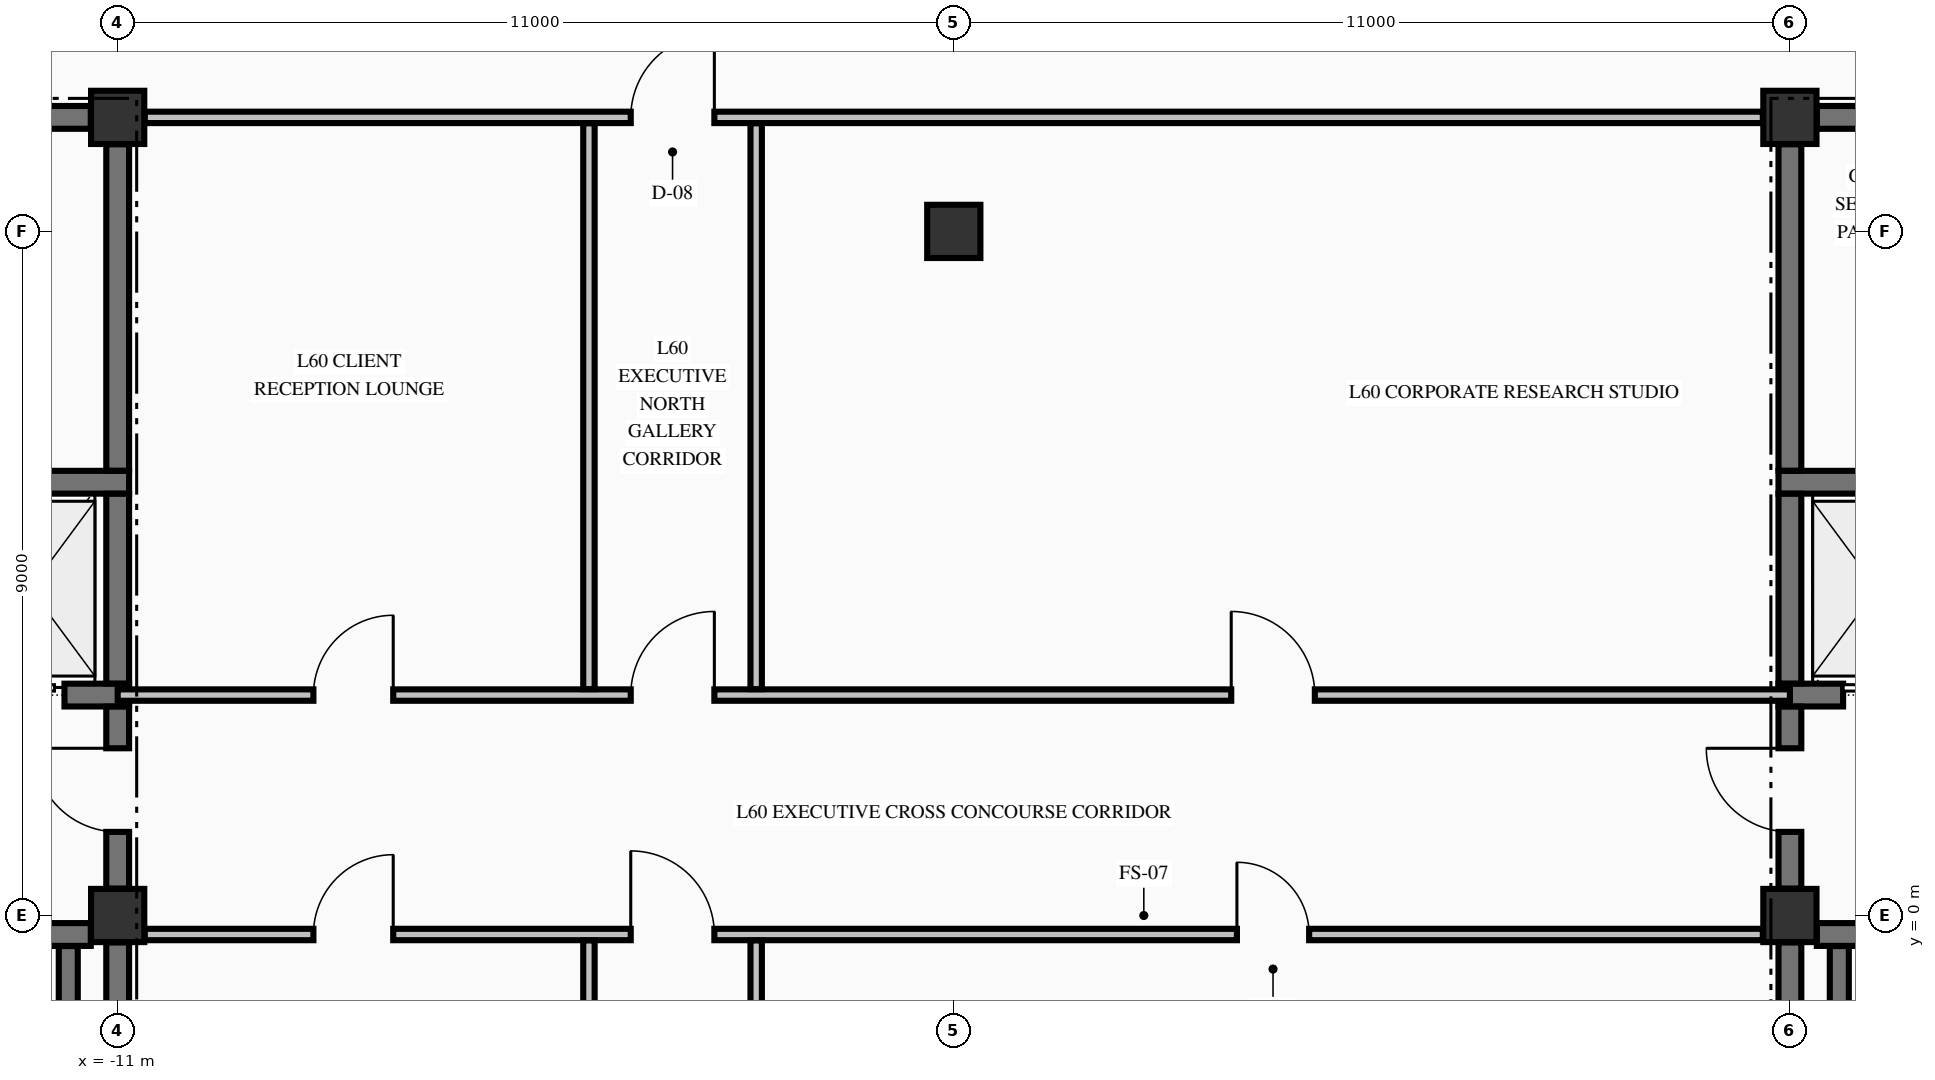
"""IFC4 building model, lengths in metres.
Left out: names, types, materials, properties, quantities, classifications, styles, units other than length and angle.
Written with IfcOpenShell. Run it as: python <this file> out.ifc"""

import sys

from ifc_helpers import new_model, si_unit, direction, frame, frame_2d, origin, origin_2d, place, context, subcontext, project, spatial, rectangle, extrude, element, fill, save


model = new_model("IFC4")
c1 = context("Model", 3, precision=1e-05, world=origin(), true_north=direction((0.0, 1.0)))
c2 = subcontext(c1, "Body", "Model", "MODEL_VIEW")
j1 = project(units=[si_unit("LENGTHUNIT", "METRE"), si_unit("PLANEANGLEUNIT", "RADIAN")], contexts=[c1])
p1 = place(None, origin())
s1 = spatial("IfcSite", under=j1, at=p1, CompositionType="ELEMENT")
p2 = place(p1, origin())
s2 = spatial("IfcBuilding", under=s1, at=p2, CompositionType="ELEMENT")
p3 = place(p2, frame((0.0, 0.0, 230.05)))
s3 = spatial("IfcBuildingStorey", under=s2, at=p3, CompositionType="ELEMENT", Elevation=230.05)
for number, where, z_axis, x_axis in (
    (1, (-11.0, 0.0, -0.25), (0.0, 0.0, 1.0), (1.0, 0.0, 0.0)),
    (2, (-11.0, 10.5, -0.25), (0.0, 0.0, 1.0), (1.0, 0.0, 0.0)),
    (3, (11.0, 0.0, -0.25), (0.0, 0.0, 1.0), (1.0, 0.0, 0.0)),
    (4, (11.0, 10.5, -0.25), (0.0, 0.0, 1.0), (1.0, 0.0, 0.0)),
    (5, (0.0, 9.0, -0.25), (0.0, 0.0, 1.0), (1.0, 0.0, 0.0)),
):
    element("IfcColumn", number, at=place(p3, frame(where, z_axis=z_axis, x_axis=x_axis)), inside=s3, PredefinedType="COLUMN", context=c2, shape_type="SweptSolid", body=[
        extrude(rectangle(XDim=0.7, YDim=0.7, at=origin_2d()), origin(), (0.0, 0.0, 1.0), 3.23),
    ])
p4 = place(p3, frame((-20.571, -0.25, 0.0), z_axis=(0.0, 0.0, 1.0), x_axis=(1.0, 0.0, 0.0)))
e6 = element("IfcWall", 6, at=p4, inside=s3, PredefinedType="SHEAR", context=c2, shape_type="SweptSolid", body=[
    extrude(rectangle(XDim=9.217, YDim=0.3, at=frame_2d((4.608, 0.0))), origin(), (0.0, 0.0, 1.0), 2.98),
])
p5 = place(p4, frame((6.871, 0.0, 0.0)))
e7 = element("IfcOpeningElement", 7, at=p5, cuts=e6, PredefinedType="OPENING", context=c2, shape_type="SweptSolid", body=[
    extrude(rectangle(XDim=1.1, YDim=2.15, at=frame_2d((0.55, 1.075))), frame((0.0, 0.16, 0.0), z_axis=(0.0, -1.0, 0.0), x_axis=(1.0, 0.0, 0.0)), (0.0, 0.0, 1.0), 0.32),
])
p6 = place(p3, frame((11.354, -0.25, 0.0), z_axis=(0.0, 0.0, 1.0), x_axis=(1.0, 0.0, 0.0)))
e8 = element("IfcWall", 8, at=p6, inside=s3, PredefinedType="SHEAR", context=c2, shape_type="SweptSolid", body=[
    extrude(rectangle(XDim=3.521, YDim=0.3, at=frame_2d((1.76, 0.0))), origin(), (0.0, 0.0, 1.0), 2.98),
])
p7 = place(p6, frame((1.246, 0.0, 0.0)))
e9 = element("IfcOpeningElement", 9, at=p7, cuts=e8, PredefinedType="OPENING", context=c2, shape_type="SweptSolid", body=[
    extrude(rectangle(XDim=1.1, YDim=2.15, at=frame_2d((0.55, 1.075))), frame((0.0, 0.16, 0.0), z_axis=(0.0, -1.0, 0.0), x_axis=(1.0, 0.0, 0.0)), (0.0, 0.0, 1.0), 0.32),
])
p8 = place(p3, frame((-14.875, 2.9, 0.0), z_axis=(0.0, 0.0, 1.0), x_axis=(1.0, 0.0, 0.0)))
e10 = element("IfcWall", 10, at=p8, inside=s3, PredefinedType="SHEAR", context=c2, shape_type="SweptSolid", body=[
    extrude(rectangle(XDim=4.025, YDim=0.3, at=frame_2d((2.012, 0.0))), origin(), (0.0, 0.0, 1.0), 2.98),
])
p9 = place(p8, frame((2.075, 0.0, 0.0)))
e11 = element("IfcOpeningElement", 11, at=p9, cuts=e10, PredefinedType="OPENING", context=c2, shape_type="SweptSolid", body=[
    extrude(rectangle(XDim=1.1, YDim=2.2, at=frame_2d((0.55, 1.1))), frame((0.0, 0.16, 0.0), z_axis=(0.0, -1.0, 0.0), x_axis=(1.0, 0.0, 0.0)), (0.0, 0.0, 1.0), 0.32),
])
p10 = place(p3, frame((10.85, 2.9, 0.0), z_axis=(0.0, 0.0, 1.0), x_axis=(1.0, 0.0, 0.0)))
e12 = element("IfcWall", 12, at=p10, inside=s3, PredefinedType="SHEAR", context=c2, shape_type="SweptSolid", body=[
    extrude(rectangle(XDim=4.025, YDim=0.3, at=frame_2d((2.012, 0.0))), origin(), (0.0, 0.0, 1.0), 2.98),
])
p11 = place(p10, frame((0.85, 0.0, 0.0)))
e13 = element("IfcOpeningElement", 13, at=p11, cuts=e12, PredefinedType="OPENING", context=c2, shape_type="SweptSolid", body=[
    extrude(rectangle(XDim=1.1, YDim=2.2, at=frame_2d((0.55, 1.1))), frame((0.0, 0.16, 0.0), z_axis=(0.0, -1.0, 0.0), x_axis=(1.0, 0.0, 0.0)), (0.0, 0.0, 1.0), 0.32),
])
for number, where, z_axis, x_axis in (
    (14, (-14.875, 5.7, 0.0), (0.0, 0.0, 1.0), (1.0, 0.0, 0.0)),
    (15, (10.85, 5.7, 0.0), (0.0, 0.0, 1.0), (1.0, 0.0, 0.0)),
):
    element("IfcWall", number, at=place(p3, frame(where, z_axis=z_axis, x_axis=x_axis)), inside=s3, PredefinedType="SHEAR", context=c2, shape_type="SweptSolid", body=[
        extrude(rectangle(XDim=4.025, YDim=0.3, at=frame_2d((2.012, 0.0))), origin(), (0.0, 0.0, 1.0), 2.98),
    ])
p12 = place(p3, frame((-14.7, 10.5, 0.0), z_axis=(0.0, 0.0, 1.0), x_axis=(1.0, 0.0, 0.0)))
e16 = element("IfcWall", 16, at=p12, inside=s3, PredefinedType="SHEAR", context=c2, shape_type="SweptSolid", body=[
    extrude(rectangle(XDim=3.346, YDim=0.3, at=frame_2d((1.673, 0.0))), origin(), (0.0, 0.0, 1.0), 2.98),
])
p13 = place(p12, frame((0.775, 0.0, 0.0)))
e17 = element("IfcOpeningElement", 17, at=p13, cuts=e16, PredefinedType="OPENING", context=c2, shape_type="SweptSolid", body=[
    extrude(rectangle(XDim=0.95, YDim=2.15, at=frame_2d((0.475, 1.075))), frame((0.0, 0.16, 0.0), z_axis=(0.0, -1.0, 0.0), x_axis=(1.0, 0.0, 0.0)), (0.0, 0.0, 1.0), 0.32),
])
p14 = place(p3, frame((11.354, 10.5, 0.0), z_axis=(0.0, 0.0, 1.0), x_axis=(1.0, 0.0, 0.0)))
e18 = element("IfcWall", 18, at=p14, inside=s3, PredefinedType="SHEAR", context=c2, shape_type="SweptSolid", body=[
    extrude(rectangle(XDim=3.346, YDim=0.3, at=frame_2d((1.673, 0.0))), origin(), (0.0, 0.0, 1.0), 2.98),
])
p15 = place(p14, frame((2.151, 0.0, 0.0)))
e19 = element("IfcOpeningElement", 19, at=p15, cuts=e18, PredefinedType="OPENING", context=c2, shape_type="SweptSolid", body=[
    extrude(rectangle(XDim=0.95, YDim=2.15, at=frame_2d((0.475, 1.075))), frame((0.0, 0.16, 0.0), z_axis=(0.0, -1.0, 0.0), x_axis=(1.0, 0.0, 0.0)), (0.0, 0.0, 1.0), 0.32),
])
p16 = place(p3, frame((-10.644, -0.25, 0.0), z_axis=(0.0, 0.0, 1.0), x_axis=(1.0, 0.0, 0.0)))
e20 = element("IfcWall", 20, at=p16, inside=s3, PredefinedType="PARTITIONING", context=c2, shape_type="SweptSolid", body=[
    extrude(rectangle(XDim=21.288, YDim=0.15, at=frame_2d((10.644, 0.0))), origin(), (0.0, 0.0, 1.0), 2.98),
])
p17 = place(p16, frame((6.394, 0.0, 0.0)))
e21 = element("IfcOpeningElement", 21, at=p17, cuts=e20, PredefinedType="OPENING", context=c2, shape_type="SweptSolid", body=[
    extrude(rectangle(XDim=1.1, YDim=2.15, at=frame_2d((0.55, 1.075))), frame((0.0, 0.085, 0.0), z_axis=(0.0, -1.0, 0.0), x_axis=(1.0, 0.0, 0.0)), (0.0, 0.0, 1.0), 0.17),
])
p18 = place(p16, frame((2.219, 0.0, 0.0)))
e22 = element("IfcOpeningElement", 22, at=p18, cuts=e20, PredefinedType="OPENING", context=c2, shape_type="SweptSolid", body=[
    extrude(rectangle(XDim=1.05, YDim=2.15, at=frame_2d((0.525, 1.075))), frame((0.0, 0.085, 0.0), z_axis=(0.0, -1.0, 0.0), x_axis=(1.0, 0.0, 0.0)), (0.0, 0.0, 1.0), 0.17),
])
p19 = place(p16, frame((14.369, 0.0, 0.0)))
e23 = element("IfcOpeningElement", 23, at=p19, cuts=e20, PredefinedType="OPENING", context=c2, shape_type="SweptSolid", body=[
    extrude(rectangle(XDim=0.95, YDim=2.15, at=frame_2d((0.475, 1.075))), frame((0.0, 0.085, 0.0), z_axis=(0.0, -1.0, 0.0), x_axis=(1.0, 0.0, 0.0)), (0.0, 0.0, 1.0), 0.17),
])
p20 = place(p3, frame((-11.0, 2.9, 0.0), z_axis=(0.0, 0.0, 1.0), x_axis=(1.0, 0.0, 0.0)))
e24 = element("IfcWall", 24, at=p20, inside=s3, PredefinedType="PARTITIONING", context=c2, shape_type="SweptSolid", body=[
    extrude(rectangle(XDim=22.0, YDim=0.15, at=frame_2d((11.0, 0.0))), origin(), (0.0, 0.0, 1.0), 2.98),
])
p21 = place(p20, frame((6.75, 0.0, 0.0)))
e25 = element("IfcOpeningElement", 25, at=p21, cuts=e24, PredefinedType="OPENING", context=c2, shape_type="SweptSolid", body=[
    extrude(rectangle(XDim=1.1, YDim=2.15, at=frame_2d((0.55, 1.075))), frame((0.0, 0.085, 0.0), z_axis=(0.0, -1.0, 0.0), x_axis=(1.0, 0.0, 0.0)), (0.0, 0.0, 1.0), 0.17),
])
p22 = place(p20, frame((2.575, 0.0, 0.0)))
e26 = element("IfcOpeningElement", 26, at=p22, cuts=e24, PredefinedType="OPENING", context=c2, shape_type="SweptSolid", body=[
    extrude(rectangle(XDim=1.05, YDim=2.15, at=frame_2d((0.525, 1.075))), frame((0.0, 0.085, 0.0), z_axis=(0.0, -1.0, 0.0), x_axis=(1.0, 0.0, 0.0)), (0.0, 0.0, 1.0), 0.17),
])
p23 = place(p20, frame((14.65, 0.0, 0.0)))
e27 = element("IfcOpeningElement", 27, at=p23, cuts=e24, PredefinedType="OPENING", context=c2, shape_type="SweptSolid", body=[
    extrude(rectangle(XDim=1.1, YDim=2.15, at=frame_2d((0.55, 1.075))), frame((0.0, 0.085, 0.0), z_axis=(0.0, -1.0, 0.0), x_axis=(1.0, 0.0, 0.0)), (0.0, 0.0, 1.0), 0.17),
])
p24 = place(p3, frame((-10.644, 10.5, 0.0), z_axis=(0.0, 0.0, 1.0), x_axis=(1.0, 0.0, 0.0)))
e28 = element("IfcWall", 28, at=p24, inside=s3, PredefinedType="PARTITIONING", context=c2, shape_type="SweptSolid", body=[
    extrude(rectangle(XDim=21.288, YDim=0.15, at=frame_2d((10.644, 0.0))), origin(), (0.0, 0.0, 1.0), 2.98),
])
p25 = place(p24, frame((6.394, 0.0, 0.0)))
e29 = element("IfcOpeningElement", 29, at=p25, cuts=e28, PredefinedType="OPENING", context=c2, shape_type="SweptSolid", body=[
    extrude(rectangle(XDim=1.1, YDim=2.15, at=frame_2d((0.55, 1.075))), frame((0.0, 0.085, 0.0), z_axis=(0.0, -1.0, 0.0), x_axis=(1.0, 0.0, 0.0)), (0.0, 0.0, 1.0), 0.17),
])
p26 = place(p3, frame((-11.65, -9.798, 0.0), z_axis=(0.0, 0.0, 1.0), x_axis=(0.0, 1.0, 0.0)))
e30 = element("IfcWall", 30, at=p26, inside=s3, PredefinedType="SOLIDWALL", context=c2, shape_type="SweptSolid", body=[
    extrude(rectangle(XDim=9.396, YDim=0.25, at=frame_2d((4.698, 0.0))), origin(), (0.0, 0.0, 1.0), 2.98),
])
p27 = place(p3, frame((-11.0, -9.596, 0.0), z_axis=(0.0, 0.0, 1.0), x_axis=(0.0, 1.0, 0.0)))
e31 = element("IfcWall", 31, at=p27, inside=s3, PredefinedType="SHEAR", context=c2, shape_type="SweptSolid", body=[
    extrude(rectangle(XDim=9.242, YDim=0.3, at=frame_2d((4.621, 0.0))), origin(), (0.0, 0.0, 1.0), 2.98),
])
p28 = place(p3, frame((-11.0, 0.354, 0.0), z_axis=(0.0, 0.0, 1.0), x_axis=(0.0, 1.0, 0.0)))
e32 = element("IfcWall", 32, at=p28, inside=s3, PredefinedType="SHEAR", context=c2, shape_type="SweptSolid", body=[
    extrude(rectangle(XDim=2.394, YDim=0.3, at=frame_2d((1.197, 0.0))), origin(), (0.0, 0.0, 1.0), 2.98),
])
p29 = place(p28, frame((0.746, 0.0, 0.0)))
e33 = element("IfcOpeningElement", 33, at=p29, cuts=e32, PredefinedType="OPENING", context=c2, shape_type="SweptSolid", body=[
    extrude(rectangle(XDim=1.1, YDim=2.15, at=frame_2d((0.55, 1.075))), frame((0.0, 0.16, 0.0), z_axis=(0.0, -1.0, 0.0), x_axis=(1.0, 0.0, 0.0)), (0.0, 0.0, 1.0), 0.32),
])
p30 = place(p3, frame((-11.0, 3.052, 0.0), z_axis=(0.0, 0.0, 1.0), x_axis=(0.0, 1.0, 0.0)))
e34 = element("IfcWall", 34, at=p30, inside=s3, PredefinedType="SHEAR", context=c2, shape_type="SweptSolid", body=[
    extrude(rectangle(XDim=2.496, YDim=0.3, at=frame_2d((1.248, 0.0))), origin(), (0.0, 0.0, 1.0), 2.98),
])
p31 = place(p3, frame((-11.0, 5.852, 0.0), z_axis=(0.0, 0.0, 1.0), x_axis=(0.0, 1.0, 0.0)))
e35 = element("IfcWall", 35, at=p31, inside=s3, PredefinedType="SHEAR", context=c2, shape_type="SweptSolid", body=[
    extrude(rectangle(XDim=4.294, YDim=0.3, at=frame_2d((2.147, 0.0))), origin(), (0.0, 0.0, 1.0), 2.98),
])
p32 = place(p3, frame((11.0, -9.596, 0.0), z_axis=(0.0, 0.0, 1.0), x_axis=(0.0, 1.0, 0.0)))
e36 = element("IfcWall", 36, at=p32, inside=s3, PredefinedType="SHEAR", context=c2, shape_type="SweptSolid", body=[
    extrude(rectangle(XDim=9.242, YDim=0.3, at=frame_2d((4.621, 0.0))), origin(), (0.0, 0.0, 1.0), 2.98),
])
p33 = place(p3, frame((11.0, 0.354, 0.0), z_axis=(0.0, 0.0, 1.0), x_axis=(0.0, 1.0, 0.0)))
e37 = element("IfcWall", 37, at=p33, inside=s3, PredefinedType="SHEAR", context=c2, shape_type="SweptSolid", body=[
    extrude(rectangle(XDim=2.394, YDim=0.3, at=frame_2d((1.197, 0.0))), origin(), (0.0, 0.0, 1.0), 2.98),
])
p34 = place(p33, frame((0.746, 0.0, 0.0)))
e38 = element("IfcOpeningElement", 38, at=p34, cuts=e37, PredefinedType="OPENING", context=c2, shape_type="SweptSolid", body=[
    extrude(rectangle(XDim=1.1, YDim=2.15, at=frame_2d((0.55, 1.075))), frame((0.0, 0.16, 0.0), z_axis=(0.0, -1.0, 0.0), x_axis=(1.0, 0.0, 0.0)), (0.0, 0.0, 1.0), 0.32),
])
p35 = place(p3, frame((11.0, 3.052, 0.0), z_axis=(0.0, 0.0, 1.0), x_axis=(0.0, 1.0, 0.0)))
e39 = element("IfcWall", 39, at=p35, inside=s3, PredefinedType="SHEAR", context=c2, shape_type="SweptSolid", body=[
    extrude(rectangle(XDim=2.496, YDim=0.3, at=frame_2d((1.248, 0.0))), origin(), (0.0, 0.0, 1.0), 2.98),
])
p36 = place(p3, frame((11.0, 5.852, 0.0), z_axis=(0.0, 0.0, 1.0), x_axis=(0.0, 1.0, 0.0)))
e40 = element("IfcWall", 40, at=p36, inside=s3, PredefinedType="SHEAR", context=c2, shape_type="SweptSolid", body=[
    extrude(rectangle(XDim=4.294, YDim=0.3, at=frame_2d((2.147, 0.0))), origin(), (0.0, 0.0, 1.0), 2.98),
])
p37 = place(p3, frame((11.65, -9.798, 0.0), z_axis=(0.0, 0.0, 1.0), x_axis=(0.0, 1.0, 0.0)))
e41 = element("IfcWall", 41, at=p37, inside=s3, PredefinedType="SOLIDWALL", context=c2, shape_type="SweptSolid", body=[
    extrude(rectangle(XDim=9.396, YDim=0.25, at=frame_2d((4.698, 0.0))), origin(), (0.0, 0.0, 1.0), 2.98),
])
p38 = place(p3, frame((-4.8, -9.872, 0.0), z_axis=(0.0, 0.0, 1.0), x_axis=(0.0, 1.0, 0.0)))
e42 = element("IfcWall", 42, at=p38, inside=s3, PredefinedType="PARTITIONING", context=c2, shape_type="SweptSolid", body=[
    extrude(rectangle(XDim=9.544, YDim=0.15, at=frame_2d((4.772, 0.0))), origin(), (0.0, 0.0, 1.0), 2.98),
])
p39 = place(p3, frame((-4.8, 2.978, 0.0), z_axis=(0.0, 0.0, 1.0), x_axis=(0.0, 1.0, 0.0)))
e43 = element("IfcWall", 43, at=p39, inside=s3, PredefinedType="PARTITIONING", context=c2, shape_type="SweptSolid", body=[
    extrude(rectangle(XDim=7.444, YDim=0.15, at=frame_2d((3.722, 0.0))), origin(), (0.0, 0.0, 1.0), 2.98),
])
p40 = place(p3, frame((-2.6, -5.247, 0.0), z_axis=(0.0, 0.0, 1.0), x_axis=(0.0, 1.0, 0.0)))
e44 = element("IfcWall", 44, at=p40, inside=s3, PredefinedType="PARTITIONING", context=c2, shape_type="SweptSolid", body=[
    extrude(rectangle(XDim=4.919, YDim=0.15, at=frame_2d((2.459, 0.0))), origin(), (0.0, 0.0, 1.0), 2.98),
])
p41 = place(p3, frame((-2.6, 2.978, 0.0), z_axis=(0.0, 0.0, 1.0), x_axis=(0.0, 1.0, 0.0)))
e45 = element("IfcWall", 45, at=p41, inside=s3, PredefinedType="PARTITIONING", context=c2, shape_type="SweptSolid", body=[
    extrude(rectangle(XDim=7.444, YDim=0.15, at=frame_2d((3.722, 0.0))), origin(), (0.0, 0.0, 1.0), 2.98),
])
p42 = place(p29, origin())
e46 = element("IfcDoor", 46, at=p42, inside=s3, OperationType="SINGLE_SWING_RIGHT", PredefinedType="DOOR", context=c2, shape_type="SweptSolid", body=[
    extrude(rectangle(XDim=1.1, YDim=2.15, at=frame_2d((0.55, 1.075))), frame((0.0, 0.025, 0.0), z_axis=(0.0, -1.0, 0.0), x_axis=(1.0, 0.0, 0.0)), (0.0, 0.0, 1.0), 0.05),
])
fill(e33, e46)
p43 = place(p9, origin())
e47 = element("IfcDoor", 47, at=p43, inside=s3, OperationType="SLIDING_TO_LEFT", PredefinedType="DOOR", context=c2, shape_type="SweptSolid", body=[
    extrude(rectangle(XDim=1.1, YDim=2.2, at=frame_2d((0.55, 1.1))), frame((0.0, 0.025, 0.0), z_axis=(0.0, -1.0, 0.0), x_axis=(1.0, 0.0, 0.0)), (0.0, 0.0, 1.0), 0.05),
])
fill(e11, e47)
p44 = place(p34, origin())
e48 = element("IfcDoor", 48, at=p44, inside=s3, OperationType="SINGLE_SWING_RIGHT", PredefinedType="DOOR", context=c2, shape_type="SweptSolid", body=[
    extrude(rectangle(XDim=1.1, YDim=2.15, at=frame_2d((0.55, 1.075))), frame((0.0, 0.025, 0.0), z_axis=(0.0, -1.0, 0.0), x_axis=(1.0, 0.0, 0.0)), (0.0, 0.0, 1.0), 0.05),
])
fill(e38, e48)
p45 = place(p11, origin())
e49 = element("IfcDoor", 49, at=p45, inside=s3, OperationType="SLIDING_TO_RIGHT", PredefinedType="DOOR", context=c2, shape_type="SweptSolid", body=[
    extrude(rectangle(XDim=1.1, YDim=2.2, at=frame_2d((0.55, 1.1))), frame((0.0, 0.025, 0.0), z_axis=(0.0, -1.0, 0.0), x_axis=(1.0, 0.0, 0.0)), (0.0, 0.0, 1.0), 0.05),
])
fill(e13, e49)
p46 = place(p25, origin())
e50 = element("IfcDoor", 50, at=p46, inside=s3, OperationType="SINGLE_SWING_RIGHT", PredefinedType="DOOR", context=c2, shape_type="SweptSolid", body=[
    extrude(rectangle(XDim=1.1, YDim=2.15, at=frame_2d((0.55, 1.075))), frame((0.0, 0.025, 0.0), z_axis=(0.0, -1.0, 0.0), x_axis=(1.0, 0.0, 0.0)), (0.0, 0.0, 1.0), 0.05),
])
fill(e29, e50)
p47 = place(p21, origin())
e51 = element("IfcDoor", 51, at=p47, inside=s3, OperationType="SINGLE_SWING_RIGHT", PredefinedType="DOOR", context=c2, shape_type="SweptSolid", body=[
    extrude(rectangle(XDim=1.1, YDim=2.15, at=frame_2d((0.55, 1.075))), frame((0.0, 0.025, 0.0), z_axis=(0.0, -1.0, 0.0), x_axis=(1.0, 0.0, 0.0)), (0.0, 0.0, 1.0), 0.05),
])
fill(e25, e51)
p48 = place(p17, origin())
e52 = element("IfcDoor", 52, at=p48, inside=s3, OperationType="SINGLE_SWING_LEFT", PredefinedType="DOOR", context=c2, shape_type="SweptSolid", body=[
    extrude(rectangle(XDim=1.1, YDim=2.15, at=frame_2d((0.55, 1.075))), frame((0.0, 0.025, 0.0), z_axis=(0.0, -1.0, 0.0), x_axis=(1.0, 0.0, 0.0)), (0.0, 0.0, 1.0), 0.05),
])
fill(e21, e52)
p49 = place(p22, origin())
e53 = element("IfcDoor", 53, at=p49, inside=s3, OperationType="SINGLE_SWING_RIGHT", PredefinedType="DOOR", context=c2, shape_type="SweptSolid", body=[
    extrude(rectangle(XDim=1.05, YDim=2.15, at=frame_2d((0.525, 1.075))), frame((0.0, 0.025, 0.0), z_axis=(0.0, -1.0, 0.0), x_axis=(1.0, 0.0, 0.0)), (0.0, 0.0, 1.0), 0.05),
])
fill(e26, e53)
p50 = place(p23, origin())
e54 = element("IfcDoor", 54, at=p50, inside=s3, OperationType="SINGLE_SWING_LEFT", PredefinedType="DOOR", context=c2, shape_type="SweptSolid", body=[
    extrude(rectangle(XDim=1.1, YDim=2.15, at=frame_2d((0.55, 1.075))), frame((0.0, 0.025, 0.0), z_axis=(0.0, -1.0, 0.0), x_axis=(1.0, 0.0, 0.0)), (0.0, 0.0, 1.0), 0.05),
])
fill(e27, e54)
p51 = place(p18, origin())
e55 = element("IfcDoor", 55, at=p51, inside=s3, OperationType="SINGLE_SWING_RIGHT", PredefinedType="DOOR", context=c2, shape_type="SweptSolid", body=[
    extrude(rectangle(XDim=1.05, YDim=2.15, at=frame_2d((0.525, 1.075))), frame((0.0, 0.025, 0.0), z_axis=(0.0, -1.0, 0.0), x_axis=(1.0, 0.0, 0.0)), (0.0, 0.0, 1.0), 0.05),
])
fill(e22, e55)
p52 = place(p19, origin())
e56 = element("IfcDoor", 56, at=p52, inside=s3, OperationType="SINGLE_SWING_LEFT", PredefinedType="DOOR", context=c2, shape_type="SweptSolid", body=[
    extrude(rectangle(XDim=0.95, YDim=2.15, at=frame_2d((0.475, 1.075))), frame((0.0, 0.025, 0.0), z_axis=(0.0, -1.0, 0.0), x_axis=(1.0, 0.0, 0.0)), (0.0, 0.0, 1.0), 0.05),
])
fill(e23, e56)
save(model, sys.argv[1])
